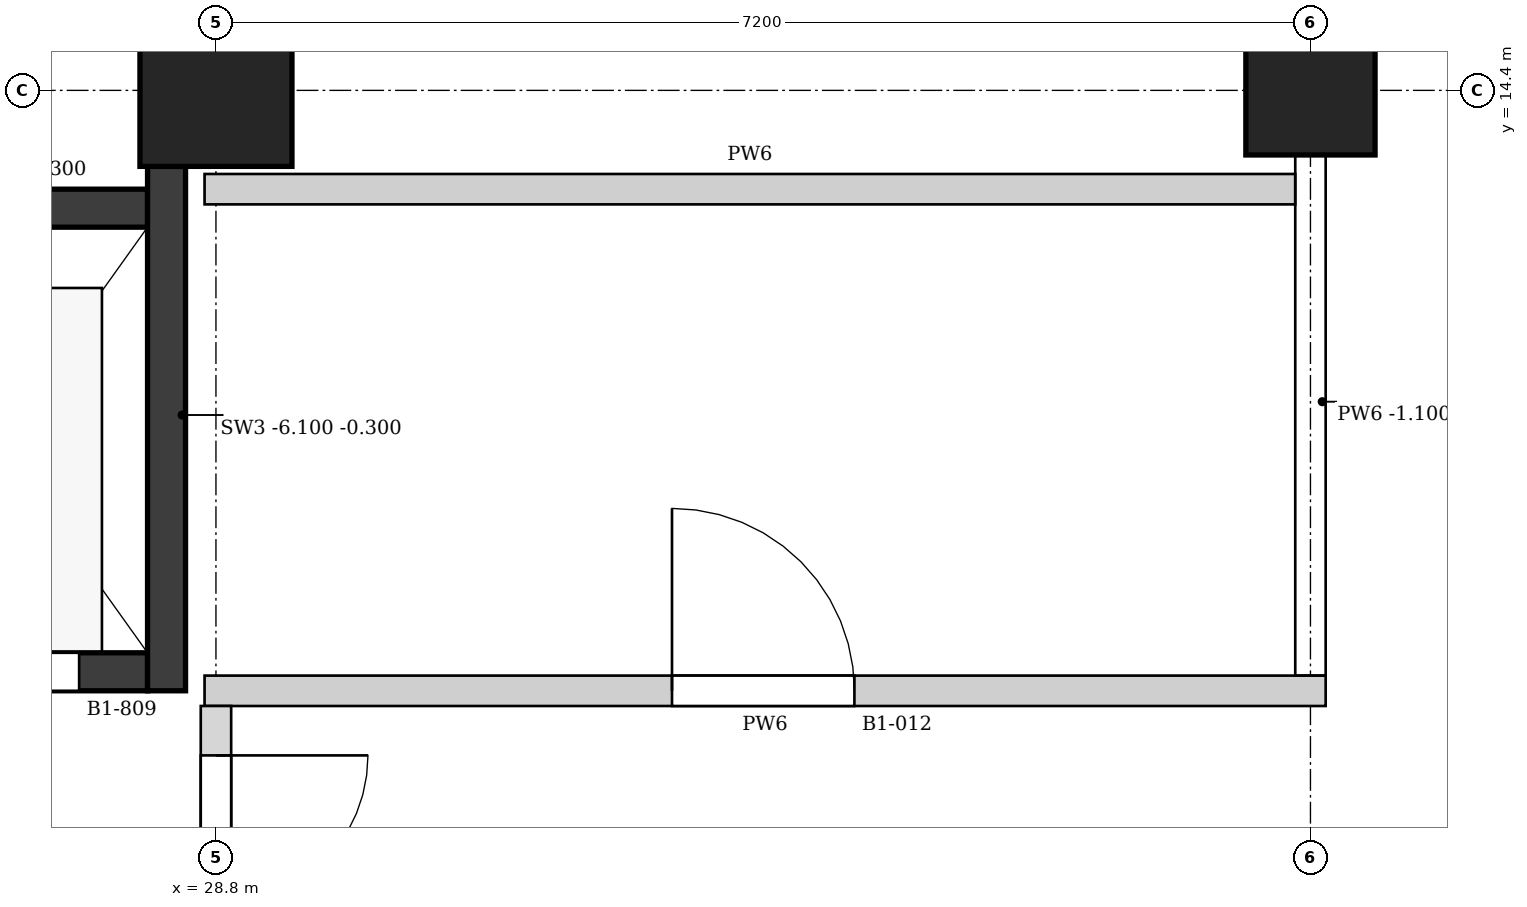
"""IFC4 building model, lengths in metres.
Left out: names, types, materials, properties, quantities, classifications, styles, units other than length and angle.
Written with IfcOpenShell. Run it as: python <this file> out.ifc"""

import sys

from ifc_helpers import new_model, si_unit, direction, frame, frame_2d, origin, origin_2d, place, context, subcontext, project, spatial, polyline, rectangle, outline, extrude, element, fill, save


model = new_model("IFC4")
c1 = context("Model", 3, precision=1e-05, world=origin(), true_north=direction((0.0, 1.0)))
c2 = subcontext(c1, "Body", "Model", "MODEL_VIEW")
j1 = project(units=[si_unit("LENGTHUNIT", "METRE"), si_unit("PLANEANGLEUNIT", "RADIAN")], contexts=[c1])
p1 = place(None, origin())
s1 = spatial("IfcSite", under=j1, at=p1, CompositionType="ELEMENT")
p2 = place(p1, origin())
s2 = spatial("IfcBuilding", under=s1, at=p2, CompositionType="ELEMENT")
p3 = place(p2, frame((0.0, 0.0, -4.5)))
s3 = spatial("IfcBuildingStorey", under=s2, at=p3, CompositionType="ELEMENT", Elevation=-4.5)
p4 = place(p3, frame((28.8, 14.4, 0.0), z_axis=(0.0, 0.0, 1.0), x_axis=(1.0, 0.0, 0.0)))
e1 = element("IfcColumn", 1, at=p4, inside=s3, PredefinedType="COLUMN", context=c2, shape_type="SweptSolid", body=[
    extrude(rectangle(XDim=1.0, YDim=1.0, at=origin_2d()), origin(), (0.0, 0.0, 1.0), 4.5),
])
p5 = place(p3, frame((36.0, 14.4, 0.0), z_axis=(0.0, 0.0, 1.0), x_axis=(1.0, 0.0, 0.0)))
e2 = element("IfcColumn", 2, at=p5, inside=s3, PredefinedType="COLUMN", context=c2, shape_type="SweptSolid", body=[
    extrude(rectangle(XDim=0.85, YDim=0.85, at=origin_2d()), origin(), (0.0, 0.0, 1.0), 4.5),
])
p6 = place(p3, frame((28.475, 10.45, -1.6), z_axis=(0.0, 0.0, 1.0), x_axis=(0.0, 1.0, 0.0)))
e3 = element("IfcWall", 3, at=p6, inside=s3, PredefinedType="SHEAR", context=c2, shape_type="SweptSolid", body=[
    extrude(rectangle(XDim=3.45, YDim=0.25, at=frame_2d((1.725, 0.0))), origin(), (0.0, 0.0, 1.0), 5.8),
])
p7 = place(p3, frame((26.35, 10.575, 0.0), z_axis=(0.0, 0.0, 1.0), x_axis=(1.0, 0.0, 0.0)))
e4 = element("IfcWall", 4, at=p7, inside=s3, PredefinedType="SHEAR", context=c2, shape_type="SweptSolid", body=[
    extrude(rectangle(XDim=2.0, YDim=0.25, at=frame_2d((1.0, 0.0))), origin(), (0.0, 0.0, 1.0), 4.2),
])
p8 = place(p7, frame((0.45, 0.0, 0.0)))
e5 = element("IfcOpeningElement", 5, at=p8, cuts=e4, PredefinedType="OPENING", context=c2, shape_type="SweptSolid", body=[
    extrude(rectangle(XDim=1.1, YDim=2.1, at=frame_2d((0.55, 1.05))), frame((0.0, 0.135, 0.0), z_axis=(0.0, -1.0, 0.0), x_axis=(1.0, 0.0, 0.0)), (0.0, 0.0, 1.0), 0.27),
])
p9 = place(p3, frame((26.35, 13.625, -1.6), z_axis=(0.0, 0.0, 1.0), x_axis=(1.0, 0.0, 0.0)))
e6 = element("IfcWall", 6, at=p9, inside=s3, PredefinedType="SHEAR", context=c2, shape_type="SweptSolid", body=[
    extrude(rectangle(XDim=2.0, YDim=0.25, at=frame_2d((1.0, 0.0))), origin(), (0.0, 0.0, 1.0), 5.8),
])
p10 = place(p3, frame((28.725, 10.45, 0.0), z_axis=(0.0, 0.0, 1.0), x_axis=(1.0, 0.0, 0.0)))
e7 = element("IfcWall", 7, at=p10, inside=s3, PredefinedType="PARTITIONING", context=c2, shape_type="SweptSolid", body=[
    extrude(outline(polyline([(0.0, 0.0), (7.375, 0.0), (7.375, 3.4), (6.975, 3.4), (6.975, 4.2), (0.375, 4.2), (0.375, 3.4), (0.0, 3.4), (0.0, 0.0)])), frame((0.0, 0.1, 0.0), z_axis=(0.0, -1.0, 0.0), x_axis=(1.0, 0.0, 0.0)), (0.0, 0.0, 1.0), 0.2),
])
p11 = place(p10, frame((3.075, 0.0, 0.0)))
e8 = element("IfcOpeningElement", 8, at=p11, cuts=e7, PredefinedType="OPENING", context=c2, shape_type="SweptSolid", body=[
    extrude(rectangle(XDim=1.2, YDim=2.1, at=frame_2d((0.6, 1.05))), frame((0.0, 0.11, 0.0), z_axis=(0.0, -1.0, 0.0), x_axis=(1.0, 0.0, 0.0)), (0.0, 0.0, 1.0), 0.22),
])
p12 = place(p3, frame((28.725, 13.75, 0.0), z_axis=(0.0, 0.0, 1.0), x_axis=(1.0, 0.0, 0.0)))
e9 = element("IfcWall", 9, at=p12, inside=s3, PredefinedType="PARTITIONING", context=c2, shape_type="SweptSolid", body=[
    extrude(outline(polyline([(0.0, 0.0), (7.175, 0.0), (7.175, 3.4), (6.975, 3.4), (6.975, 4.2), (0.375, 4.2), (0.375, 3.4), (0.0, 3.4), (0.0, 0.0)])), frame((0.0, 0.1, 0.0), z_axis=(0.0, -1.0, 0.0), x_axis=(1.0, 0.0, 0.0)), (0.0, 0.0, 1.0), 0.2),
])
p13 = place(p3, frame((28.8, 7.7, 0.0), z_axis=(0.0, 0.0, 1.0), x_axis=(0.0, 1.0, 0.0)))
e10 = element("IfcWall", 10, at=p13, inside=s3, PredefinedType="PARTITIONING", context=c2, shape_type="SweptSolid", body=[
    extrude(rectangle(XDim=2.65, YDim=0.2, at=frame_2d((1.325, 0.0))), origin(), (0.0, 0.0, 1.0), 3.4),
])
p14 = place(p13, frame((0.325, 0.0, 0.0)))
e11 = element("IfcOpeningElement", 11, at=p14, cuts=e10, PredefinedType="OPENING", context=c2, shape_type="SweptSolid", body=[
    extrude(rectangle(XDim=2.0, YDim=2.4, at=frame_2d((1.0, 1.2))), frame((0.0, 0.11, 0.0), z_axis=(0.0, -1.0, 0.0), x_axis=(1.0, 0.0, 0.0)), (0.0, 0.0, 1.0), 0.22),
])
p15 = place(p3, frame((36.0, 10.55, 0.0), z_axis=(0.0, 0.0, 1.0), x_axis=(0.0, 1.0, 0.0)))
e12 = element("IfcWall", 12, at=p15, inside=s3, PredefinedType="PARTITIONING", context=c2, shape_type="SweptSolid", body=[
    extrude(rectangle(XDim=3.425, YDim=0.2, at=frame_2d((1.712, 0.0))), origin(), (0.0, 0.0, 1.0), 3.4),
])
p16 = place(p8, origin())
e13 = element("IfcDoor", 13, at=p16, inside=s3, OperationType="SLIDING_TO_LEFT", PredefinedType="DOOR", context=c2, shape_type="SweptSolid", body=[
    extrude(rectangle(XDim=1.1, YDim=2.1, at=frame_2d((0.55, 1.05))), frame((0.0, 0.025, 0.0), z_axis=(0.0, -1.0, 0.0), x_axis=(1.0, 0.0, 0.0)), (0.0, 0.0, 1.0), 0.05),
])
fill(e5, e13)
p17 = place(p14, origin())
e14 = element("IfcDoor", 14, at=p17, inside=s3, OperationType="DOUBLE_DOOR_SINGLE_SWING", PredefinedType="DOOR", context=c2, shape_type="SweptSolid", body=[
    extrude(rectangle(XDim=2.0, YDim=2.4, at=frame_2d((1.0, 1.2))), frame((0.0, 0.025, 0.0), z_axis=(0.0, -1.0, 0.0), x_axis=(1.0, 0.0, 0.0)), (0.0, 0.0, 1.0), 0.05),
])
fill(e11, e14)
p18 = place(p11, origin())
e15 = element("IfcDoor", 15, at=p18, inside=s3, OperationType="SINGLE_SWING_LEFT", PredefinedType="DOOR", context=c2, shape_type="SweptSolid", body=[
    extrude(rectangle(XDim=1.2, YDim=2.1, at=frame_2d((0.6, 1.05))), frame((0.0, 0.025, 0.0), z_axis=(0.0, -1.0, 0.0), x_axis=(1.0, 0.0, 0.0)), (0.0, 0.0, 1.0), 0.05),
])
fill(e8, e15)
save(model, sys.argv[1])
